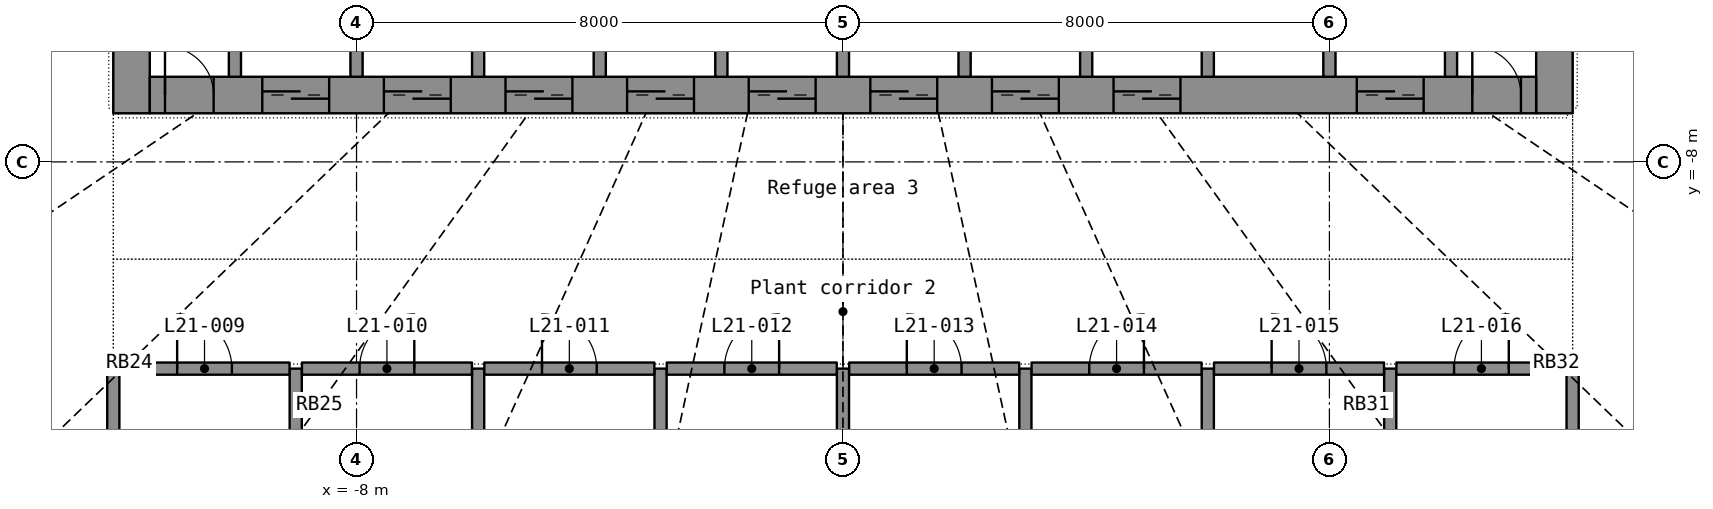
"""IFC4 building model, lengths in metres.
Left out: names, types, materials, properties, quantities, classifications, styles, units other than length and angle.
Written with IfcOpenShell. Run it as: python <this file> out.ifc"""

import sys

from ifc_helpers import new_model, si_unit, direction, frame, frame_2d, origin, place, context, subcontext, project, spatial, rectangle, extrude, element, fill, save


model = new_model("IFC4")
c1 = context("Model", 3, precision=1e-05, world=origin(), true_north=direction((0.0, 1.0)))
c2 = subcontext(c1, "Body", "Model", "MODEL_VIEW")
j1 = project(units=[si_unit("LENGTHUNIT", "METRE"), si_unit("PLANEANGLEUNIT", "RADIAN")], contexts=[c1])
p1 = place(None, origin())
s1 = spatial("IfcSite", under=j1, at=p1, CompositionType="ELEMENT")
p2 = place(p1, origin())
s2 = spatial("IfcBuilding", under=s1, at=p2, CompositionType="ELEMENT")
p3 = place(p2, frame((0.0, 0.0, 92.6)))
s3 = spatial("IfcBuildingStorey", under=s2, at=p3, CompositionType="ELEMENT", Elevation=92.6)
p4 = place(p3, frame((-11.7, -7.2, 0.0), z_axis=(0.0, 0.0, 1.0), x_axis=(0.0, 1.0, 0.0)))
e1 = element("IfcWall", 1, at=p4, inside=s3, PredefinedType="SHEAR", context=c2, shape_type="SweptSolid", body=[
    extrude(rectangle(XDim=14.4, YDim=0.6, at=frame_2d((7.2, 0.0))), origin(), (0.0, 0.0, 1.0), 4.1),
])
p5 = place(p4, frame((6.5, 0.0, 0.0)))
e2 = element("IfcOpeningElement", 2, at=p5, cuts=e1, PredefinedType="OPENING", context=c2, shape_type="SweptSolid", body=[
    extrude(rectangle(XDim=1.4, YDim=2.2, at=frame_2d((0.7, 1.1))), frame((0.0, 0.31, 0.0), z_axis=(0.0, -1.0, 0.0), x_axis=(1.0, 0.0, 0.0)), (0.0, 0.0, 1.0), 0.62),
])
p6 = place(p3, frame((11.7, -7.2, 0.0), z_axis=(0.0, 0.0, 1.0), x_axis=(0.0, 1.0, 0.0)))
e3 = element("IfcWall", 3, at=p6, inside=s3, PredefinedType="SHEAR", context=c2, shape_type="SweptSolid", body=[
    extrude(rectangle(XDim=14.4, YDim=0.6, at=frame_2d((7.2, 0.0))), origin(), (0.0, 0.0, 1.0), 4.1),
])
p7 = place(p6, frame((6.5, 0.0, 0.0)))
e4 = element("IfcOpeningElement", 4, at=p7, cuts=e3, PredefinedType="OPENING", context=c2, shape_type="SweptSolid", body=[
    extrude(rectangle(XDim=1.4, YDim=2.2, at=frame_2d((0.7, 1.1))), frame((0.0, 0.31, 0.0), z_axis=(0.0, -1.0, 0.0), x_axis=(1.0, 0.0, 0.0)), (0.0, 0.0, 1.0), 0.62),
])
p8 = place(p3, frame((-11.4, -6.9, 0.0), z_axis=(0.0, 0.0, 1.0), x_axis=(1.0, 0.0, 0.0)))
e5 = element("IfcWall", 5, at=p8, inside=s3, PredefinedType="SHEAR", context=c2, shape_type="SweptSolid", body=[
    extrude(rectangle(XDim=22.8, YDim=0.6, at=frame_2d((11.4, 0.0))), origin(), (0.0, 0.0, 1.0), 4.1),
])
p9 = place(p8, frame((1.85, 0.0, 0.0)))
e6 = element("IfcOpeningElement", 6, at=p9, cuts=e5, PredefinedType="OPENING", context=c2, shape_type="SweptSolid", body=[
    extrude(rectangle(XDim=1.1, YDim=2.2, at=frame_2d((0.55, 1.1))), frame((0.0, 0.31, 0.0), z_axis=(0.0, -1.0, 0.0), x_axis=(1.0, 0.0, 0.0)), (0.0, 0.0, 1.0), 0.62),
])
p10 = place(p8, frame((3.85, 0.0, 0.0)))
e7 = element("IfcOpeningElement", 7, at=p10, cuts=e5, PredefinedType="OPENING", context=c2, shape_type="SweptSolid", body=[
    extrude(rectangle(XDim=1.1, YDim=2.2, at=frame_2d((0.55, 1.1))), frame((0.0, 0.31, 0.0), z_axis=(0.0, -1.0, 0.0), x_axis=(1.0, 0.0, 0.0)), (0.0, 0.0, 1.0), 0.62),
])
p11 = place(p8, frame((5.85, 0.0, 0.0)))
e8 = element("IfcOpeningElement", 8, at=p11, cuts=e5, PredefinedType="OPENING", context=c2, shape_type="SweptSolid", body=[
    extrude(rectangle(XDim=1.1, YDim=2.2, at=frame_2d((0.55, 1.1))), frame((0.0, 0.31, 0.0), z_axis=(0.0, -1.0, 0.0), x_axis=(1.0, 0.0, 0.0)), (0.0, 0.0, 1.0), 0.62),
])
p12 = place(p8, frame((7.85, 0.0, 0.0)))
e9 = element("IfcOpeningElement", 9, at=p12, cuts=e5, PredefinedType="OPENING", context=c2, shape_type="SweptSolid", body=[
    extrude(rectangle(XDim=1.1, YDim=2.2, at=frame_2d((0.55, 1.1))), frame((0.0, 0.31, 0.0), z_axis=(0.0, -1.0, 0.0), x_axis=(1.0, 0.0, 0.0)), (0.0, 0.0, 1.0), 0.62),
])
p13 = place(p8, frame((9.85, 0.0, 0.0)))
e10 = element("IfcOpeningElement", 10, at=p13, cuts=e5, PredefinedType="OPENING", context=c2, shape_type="SweptSolid", body=[
    extrude(rectangle(XDim=1.1, YDim=2.2, at=frame_2d((0.55, 1.1))), frame((0.0, 0.31, 0.0), z_axis=(0.0, -1.0, 0.0), x_axis=(1.0, 0.0, 0.0)), (0.0, 0.0, 1.0), 0.62),
])
p14 = place(p8, frame((11.85, 0.0, 0.0)))
e11 = element("IfcOpeningElement", 11, at=p14, cuts=e5, PredefinedType="OPENING", context=c2, shape_type="SweptSolid", body=[
    extrude(rectangle(XDim=1.1, YDim=2.2, at=frame_2d((0.55, 1.1))), frame((0.0, 0.31, 0.0), z_axis=(0.0, -1.0, 0.0), x_axis=(1.0, 0.0, 0.0)), (0.0, 0.0, 1.0), 0.62),
])
p15 = place(p8, frame((13.85, 0.0, 0.0)))
e12 = element("IfcOpeningElement", 12, at=p15, cuts=e5, PredefinedType="OPENING", context=c2, shape_type="SweptSolid", body=[
    extrude(rectangle(XDim=1.1, YDim=2.2, at=frame_2d((0.55, 1.1))), frame((0.0, 0.31, 0.0), z_axis=(0.0, -1.0, 0.0), x_axis=(1.0, 0.0, 0.0)), (0.0, 0.0, 1.0), 0.62),
])
p16 = place(p8, frame((15.85, 0.0, 0.0)))
e13 = element("IfcOpeningElement", 13, at=p16, cuts=e5, PredefinedType="OPENING", context=c2, shape_type="SweptSolid", body=[
    extrude(rectangle(XDim=1.1, YDim=2.2, at=frame_2d((0.55, 1.1))), frame((0.0, 0.31, 0.0), z_axis=(0.0, -1.0, 0.0), x_axis=(1.0, 0.0, 0.0)), (0.0, 0.0, 1.0), 0.62),
])
p17 = place(p8, frame((19.85, 0.0, 0.0)))
e14 = element("IfcOpeningElement", 14, at=p17, cuts=e5, PredefinedType="OPENING", context=c2, shape_type="SweptSolid", body=[
    extrude(rectangle(XDim=1.1, YDim=2.2, at=frame_2d((0.55, 1.1))), frame((0.0, 0.31, 0.0), z_axis=(0.0, -1.0, 0.0), x_axis=(1.0, 0.0, 0.0)), (0.0, 0.0, 1.0), 0.62),
])
p18 = place(p8, frame((0.25, 0.0, 0.0)))
e15 = element("IfcOpeningElement", 15, at=p18, cuts=e5, PredefinedType="OPENING", context=c2, shape_type="SweptSolid", body=[
    extrude(rectangle(XDim=0.8, YDim=2.05, at=frame_2d((0.4, 1.025))), frame((0.0, 0.31, 0.0), z_axis=(0.0, -1.0, 0.0), x_axis=(1.0, 0.0, 0.0)), (0.0, 0.0, 1.0), 0.62),
])
p19 = place(p8, frame((21.75, 0.0, 0.0)))
e16 = element("IfcOpeningElement", 16, at=p19, cuts=e5, PredefinedType="OPENING", context=c2, shape_type="SweptSolid", body=[
    extrude(rectangle(XDim=0.8, YDim=2.05, at=frame_2d((0.4, 1.025))), frame((0.0, 0.31, 0.0), z_axis=(0.0, -1.0, 0.0), x_axis=(1.0, 0.0, 0.0)), (0.0, 0.0, 1.0), 0.62),
])
for number, where, z_axis, x_axis in (
    (17, (-10.0, -6.6, 0.0), (0.0, 0.0, 1.0), (0.0, 1.0, 0.0)),
    (18, (-8.0, -6.6, 0.0), (0.0, 0.0, 1.0), (0.0, 1.0, 0.0)),
    (19, (-6.0, -6.6, 0.0), (0.0, 0.0, 1.0), (0.0, 1.0, 0.0)),
    (20, (-4.0, -6.6, 0.0), (0.0, 0.0, 1.0), (0.0, 1.0, 0.0)),
    (21, (-2.0, -6.6, 0.0), (0.0, 0.0, 1.0), (0.0, 1.0, 0.0)),
    (22, (0.0, -6.6, 0.0), (0.0, 0.0, 1.0), (0.0, 1.0, 0.0)),
    (23, (2.0, -6.6, 0.0), (0.0, 0.0, 1.0), (0.0, 1.0, 0.0)),
    (24, (4.0, -6.6, 0.0), (0.0, 0.0, 1.0), (0.0, 1.0, 0.0)),
    (25, (6.0, -6.6, 0.0), (0.0, 0.0, 1.0), (0.0, 1.0, 0.0)),
    (26, (8.0, -6.6, 0.0), (0.0, 0.0, 1.0), (0.0, 1.0, 0.0)),
    (27, (10.0, -6.6, 0.0), (0.0, 0.0, 1.0), (0.0, 1.0, 0.0)),
):
    element("IfcWall", number, at=place(p3, frame(where, z_axis=z_axis, x_axis=x_axis)), inside=s3, PredefinedType="SHEAR", context=c2, shape_type="SweptSolid", body=[
        extrude(rectangle(XDim=2.7, YDim=0.2, at=frame_2d((1.35, 0.0))), origin(), (0.0, 0.0, 1.0), 4.1),
    ])
p20 = place(p3, frame((0.0, -21.51, 0.0), z_axis=(0.0, 0.0, 1.0), x_axis=(0.0, 1.0, 0.0)))
e28 = element("IfcWall", 28, at=p20, inside=s3, PredefinedType="PARTITIONING", context=c2, shape_type="SweptSolid", body=[
    extrude(rectangle(XDim=10.11, YDim=0.2, at=frame_2d((5.055, 0.0))), origin(), (0.0, 0.0, 1.0), 3.3),
])
for number, where, z_axis, x_axis in (
    (29, (-3.0, -21.186, 0.0), (0.0, 0.0, 1.0), (0.0, 1.0, 0.0)),
    (30, (3.0, -21.186, 0.0), (0.0, 0.0, 1.0), (0.0, 1.0, 0.0)),
):
    element("IfcWall", number, at=place(p3, frame(where, z_axis=z_axis, x_axis=x_axis)), inside=s3, PredefinedType="PARTITIONING", context=c2, shape_type="SweptSolid", body=[
        extrude(rectangle(XDim=9.786, YDim=0.2, at=frame_2d((4.893, 0.0))), origin(), (0.0, 0.0, 1.0), 3.3),
    ])
for number, where, z_axis, x_axis in (
    (31, (-6.0, -20.862, 0.0), (0.0, 0.0, 1.0), (0.0, 1.0, 0.0)),
    (32, (6.0, -20.862, 0.0), (0.0, 0.0, 1.0), (0.0, 1.0, 0.0)),
):
    element("IfcWall", number, at=place(p3, frame(where, z_axis=z_axis, x_axis=x_axis)), inside=s3, PredefinedType="PARTITIONING", context=c2, shape_type="SweptSolid", body=[
        extrude(rectangle(XDim=9.462, YDim=0.2, at=frame_2d((4.731, 0.0))), origin(), (0.0, 0.0, 1.0), 3.3),
    ])
for number, where, z_axis, x_axis in (
    (33, (-9.0, -20.031, 0.0), (0.0, 0.0, 1.0), (0.0, 1.0, 0.0)),
    (34, (9.0, -20.031, 0.0), (0.0, 0.0, 1.0), (0.0, 1.0, 0.0)),
):
    element("IfcWall", number, at=place(p3, frame(where, z_axis=z_axis, x_axis=x_axis)), inside=s3, PredefinedType="PARTITIONING", context=c2, shape_type="SweptSolid", body=[
        extrude(rectangle(XDim=8.631, YDim=0.2, at=frame_2d((4.316, 0.0))), origin(), (0.0, 0.0, 1.0), 3.3),
    ])
for number, where, z_axis, x_axis in (
    (35, (-12.0, -11.388, 0.0), (0.0, 0.0, 1.0), (0.0, -1.0, 0.0)),
    (36, (12.0, -19.013, 0.0), (0.0, 0.0, 1.0), (0.0, 1.0, 0.0)),
):
    element("IfcWall", number, at=place(p3, frame(where, z_axis=z_axis, x_axis=x_axis)), inside=s3, PredefinedType="PARTITIONING", context=c2, shape_type="SweptSolid", body=[
        extrude(rectangle(XDim=7.625, YDim=0.2, at=frame_2d((3.813, 0.0))), origin(), (0.0, 0.0, 1.0), 3.3),
    ])
p21 = place(p3, frame((-11.898, -11.4, 0.0), z_axis=(0.0, 0.0, 1.0), x_axis=(1.0, 0.0, 0.0)))
e37 = element("IfcWall", 37, at=p21, inside=s3, PredefinedType="PARTITIONING", context=c2, shape_type="SweptSolid", body=[
    extrude(rectangle(XDim=2.796, YDim=0.2, at=frame_2d((1.398, 0.0))), origin(), (0.0, 0.0, 1.0), 3.3),
])
p22 = place(p21, frame((0.948, 0.0, 0.0)))
e38 = element("IfcOpeningElement", 38, at=p22, cuts=e37, PredefinedType="OPENING", context=c2, shape_type="SweptSolid", body=[
    extrude(rectangle(XDim=0.9, YDim=2.1, at=frame_2d((0.45, 1.05))), frame((0.0, 0.11, 0.0), z_axis=(0.0, -1.0, 0.0), x_axis=(1.0, 0.0, 0.0)), (0.0, 0.0, 1.0), 0.22),
])
p23 = place(p3, frame((-8.898, -11.4, 0.0), z_axis=(0.0, 0.0, 1.0), x_axis=(1.0, 0.0, 0.0)))
e39 = element("IfcWall", 39, at=p23, inside=s3, PredefinedType="PARTITIONING", context=c2, shape_type="SweptSolid", body=[
    extrude(rectangle(XDim=2.796, YDim=0.2, at=frame_2d((1.398, 0.0))), origin(), (0.0, 0.0, 1.0), 3.3),
])
p24 = place(p23, frame((0.948, 0.0, 0.0)))
e40 = element("IfcOpeningElement", 40, at=p24, cuts=e39, PredefinedType="OPENING", context=c2, shape_type="SweptSolid", body=[
    extrude(rectangle(XDim=0.9, YDim=2.1, at=frame_2d((0.45, 1.05))), frame((0.0, 0.11, 0.0), z_axis=(0.0, -1.0, 0.0), x_axis=(1.0, 0.0, 0.0)), (0.0, 0.0, 1.0), 0.22),
])
p25 = place(p3, frame((-5.898, -11.4, 0.0), z_axis=(0.0, 0.0, 1.0), x_axis=(1.0, 0.0, 0.0)))
e41 = element("IfcWall", 41, at=p25, inside=s3, PredefinedType="PARTITIONING", context=c2, shape_type="SweptSolid", body=[
    extrude(rectangle(XDim=2.796, YDim=0.2, at=frame_2d((1.398, 0.0))), origin(), (0.0, 0.0, 1.0), 3.3),
])
p26 = place(p25, frame((0.948, 0.0, 0.0)))
e42 = element("IfcOpeningElement", 42, at=p26, cuts=e41, PredefinedType="OPENING", context=c2, shape_type="SweptSolid", body=[
    extrude(rectangle(XDim=0.9, YDim=2.1, at=frame_2d((0.45, 1.05))), frame((0.0, 0.11, 0.0), z_axis=(0.0, -1.0, 0.0), x_axis=(1.0, 0.0, 0.0)), (0.0, 0.0, 1.0), 0.22),
])
p27 = place(p3, frame((-2.898, -11.4, 0.0), z_axis=(0.0, 0.0, 1.0), x_axis=(1.0, 0.0, 0.0)))
e43 = element("IfcWall", 43, at=p27, inside=s3, PredefinedType="PARTITIONING", context=c2, shape_type="SweptSolid", body=[
    extrude(rectangle(XDim=2.796, YDim=0.2, at=frame_2d((1.398, 0.0))), origin(), (0.0, 0.0, 1.0), 3.3),
])
p28 = place(p27, frame((0.948, 0.0, 0.0)))
e44 = element("IfcOpeningElement", 44, at=p28, cuts=e43, PredefinedType="OPENING", context=c2, shape_type="SweptSolid", body=[
    extrude(rectangle(XDim=0.9, YDim=2.1, at=frame_2d((0.45, 1.05))), frame((0.0, 0.11, 0.0), z_axis=(0.0, -1.0, 0.0), x_axis=(1.0, 0.0, 0.0)), (0.0, 0.0, 1.0), 0.22),
])
p29 = place(p3, frame((0.102, -11.4, 0.0), z_axis=(0.0, 0.0, 1.0), x_axis=(1.0, 0.0, 0.0)))
e45 = element("IfcWall", 45, at=p29, inside=s3, PredefinedType="PARTITIONING", context=c2, shape_type="SweptSolid", body=[
    extrude(rectangle(XDim=2.796, YDim=0.2, at=frame_2d((1.398, 0.0))), origin(), (0.0, 0.0, 1.0), 3.3),
])
p30 = place(p29, frame((0.948, 0.0, 0.0)))
e46 = element("IfcOpeningElement", 46, at=p30, cuts=e45, PredefinedType="OPENING", context=c2, shape_type="SweptSolid", body=[
    extrude(rectangle(XDim=0.9, YDim=2.1, at=frame_2d((0.45, 1.05))), frame((0.0, 0.11, 0.0), z_axis=(0.0, -1.0, 0.0), x_axis=(1.0, 0.0, 0.0)), (0.0, 0.0, 1.0), 0.22),
])
p31 = place(p3, frame((3.102, -11.4, 0.0), z_axis=(0.0, 0.0, 1.0), x_axis=(1.0, 0.0, 0.0)))
e47 = element("IfcWall", 47, at=p31, inside=s3, PredefinedType="PARTITIONING", context=c2, shape_type="SweptSolid", body=[
    extrude(rectangle(XDim=2.796, YDim=0.2, at=frame_2d((1.398, 0.0))), origin(), (0.0, 0.0, 1.0), 3.3),
])
p32 = place(p31, frame((0.948, 0.0, 0.0)))
e48 = element("IfcOpeningElement", 48, at=p32, cuts=e47, PredefinedType="OPENING", context=c2, shape_type="SweptSolid", body=[
    extrude(rectangle(XDim=0.9, YDim=2.1, at=frame_2d((0.45, 1.05))), frame((0.0, 0.11, 0.0), z_axis=(0.0, -1.0, 0.0), x_axis=(1.0, 0.0, 0.0)), (0.0, 0.0, 1.0), 0.22),
])
p33 = place(p3, frame((6.102, -11.4, 0.0), z_axis=(0.0, 0.0, 1.0), x_axis=(1.0, 0.0, 0.0)))
e49 = element("IfcWall", 49, at=p33, inside=s3, PredefinedType="PARTITIONING", context=c2, shape_type="SweptSolid", body=[
    extrude(rectangle(XDim=2.796, YDim=0.2, at=frame_2d((1.398, 0.0))), origin(), (0.0, 0.0, 1.0), 3.3),
])
p34 = place(p33, frame((0.948, 0.0, 0.0)))
e50 = element("IfcOpeningElement", 50, at=p34, cuts=e49, PredefinedType="OPENING", context=c2, shape_type="SweptSolid", body=[
    extrude(rectangle(XDim=0.9, YDim=2.1, at=frame_2d((0.45, 1.05))), frame((0.0, 0.11, 0.0), z_axis=(0.0, -1.0, 0.0), x_axis=(1.0, 0.0, 0.0)), (0.0, 0.0, 1.0), 0.22),
])
p35 = place(p3, frame((9.102, -11.4, 0.0), z_axis=(0.0, 0.0, 1.0), x_axis=(1.0, 0.0, 0.0)))
e51 = element("IfcWall", 51, at=p35, inside=s3, PredefinedType="PARTITIONING", context=c2, shape_type="SweptSolid", body=[
    extrude(rectangle(XDim=2.796, YDim=0.2, at=frame_2d((1.398, 0.0))), origin(), (0.0, 0.0, 1.0), 3.3),
])
p36 = place(p35, frame((0.948, 0.0, 0.0)))
e52 = element("IfcOpeningElement", 52, at=p36, cuts=e51, PredefinedType="OPENING", context=c2, shape_type="SweptSolid", body=[
    extrude(rectangle(XDim=0.9, YDim=2.1, at=frame_2d((0.45, 1.05))), frame((0.0, 0.11, 0.0), z_axis=(0.0, -1.0, 0.0), x_axis=(1.0, 0.0, 0.0)), (0.0, 0.0, 1.0), 0.22),
])
p37 = place(p9, origin())
e53 = element("IfcDoor", 53, at=p37, inside=s3, OperationType="DOUBLE_DOOR_SLIDING", PredefinedType="DOOR", context=c2, shape_type="SweptSolid", body=[
    extrude(rectangle(XDim=1.1, YDim=2.2, at=frame_2d((0.55, 1.1))), frame((0.0, 0.025, 0.0), z_axis=(0.0, -1.0, 0.0), x_axis=(1.0, 0.0, 0.0)), (0.0, 0.0, 1.0), 0.05),
])
fill(e6, e53)
p38 = place(p10, origin())
e54 = element("IfcDoor", 54, at=p38, inside=s3, OperationType="DOUBLE_DOOR_SLIDING", PredefinedType="DOOR", context=c2, shape_type="SweptSolid", body=[
    extrude(rectangle(XDim=1.1, YDim=2.2, at=frame_2d((0.55, 1.1))), frame((0.0, 0.025, 0.0), z_axis=(0.0, -1.0, 0.0), x_axis=(1.0, 0.0, 0.0)), (0.0, 0.0, 1.0), 0.05),
])
fill(e7, e54)
p39 = place(p11, origin())
e55 = element("IfcDoor", 55, at=p39, inside=s3, OperationType="DOUBLE_DOOR_SLIDING", PredefinedType="DOOR", context=c2, shape_type="SweptSolid", body=[
    extrude(rectangle(XDim=1.1, YDim=2.2, at=frame_2d((0.55, 1.1))), frame((0.0, 0.025, 0.0), z_axis=(0.0, -1.0, 0.0), x_axis=(1.0, 0.0, 0.0)), (0.0, 0.0, 1.0), 0.05),
])
fill(e8, e55)
p40 = place(p12, origin())
e56 = element("IfcDoor", 56, at=p40, inside=s3, OperationType="DOUBLE_DOOR_SLIDING", PredefinedType="DOOR", context=c2, shape_type="SweptSolid", body=[
    extrude(rectangle(XDim=1.1, YDim=2.2, at=frame_2d((0.55, 1.1))), frame((0.0, 0.025, 0.0), z_axis=(0.0, -1.0, 0.0), x_axis=(1.0, 0.0, 0.0)), (0.0, 0.0, 1.0), 0.05),
])
fill(e9, e56)
p41 = place(p13, origin())
e57 = element("IfcDoor", 57, at=p41, inside=s3, OperationType="DOUBLE_DOOR_SLIDING", PredefinedType="DOOR", context=c2, shape_type="SweptSolid", body=[
    extrude(rectangle(XDim=1.1, YDim=2.2, at=frame_2d((0.55, 1.1))), frame((0.0, 0.025, 0.0), z_axis=(0.0, -1.0, 0.0), x_axis=(1.0, 0.0, 0.0)), (0.0, 0.0, 1.0), 0.05),
])
fill(e10, e57)
p42 = place(p14, origin())
e58 = element("IfcDoor", 58, at=p42, inside=s3, OperationType="DOUBLE_DOOR_SLIDING", PredefinedType="DOOR", context=c2, shape_type="SweptSolid", body=[
    extrude(rectangle(XDim=1.1, YDim=2.2, at=frame_2d((0.55, 1.1))), frame((0.0, 0.025, 0.0), z_axis=(0.0, -1.0, 0.0), x_axis=(1.0, 0.0, 0.0)), (0.0, 0.0, 1.0), 0.05),
])
fill(e11, e58)
p43 = place(p15, origin())
e59 = element("IfcDoor", 59, at=p43, inside=s3, OperationType="DOUBLE_DOOR_SLIDING", PredefinedType="DOOR", context=c2, shape_type="SweptSolid", body=[
    extrude(rectangle(XDim=1.1, YDim=2.2, at=frame_2d((0.55, 1.1))), frame((0.0, 0.025, 0.0), z_axis=(0.0, -1.0, 0.0), x_axis=(1.0, 0.0, 0.0)), (0.0, 0.0, 1.0), 0.05),
])
fill(e12, e59)
p44 = place(p16, origin())
e60 = element("IfcDoor", 60, at=p44, inside=s3, OperationType="DOUBLE_DOOR_SLIDING", PredefinedType="DOOR", context=c2, shape_type="SweptSolid", body=[
    extrude(rectangle(XDim=1.1, YDim=2.2, at=frame_2d((0.55, 1.1))), frame((0.0, 0.025, 0.0), z_axis=(0.0, -1.0, 0.0), x_axis=(1.0, 0.0, 0.0)), (0.0, 0.0, 1.0), 0.05),
])
fill(e13, e60)
p45 = place(p17, origin())
e61 = element("IfcDoor", 61, at=p45, inside=s3, OperationType="DOUBLE_DOOR_SLIDING", PredefinedType="DOOR", context=c2, shape_type="SweptSolid", body=[
    extrude(rectangle(XDim=1.1, YDim=2.2, at=frame_2d((0.55, 1.1))), frame((0.0, 0.025, 0.0), z_axis=(0.0, -1.0, 0.0), x_axis=(1.0, 0.0, 0.0)), (0.0, 0.0, 1.0), 0.05),
])
fill(e14, e61)
p46 = place(p18, origin())
e62 = element("IfcDoor", 62, at=p46, inside=s3, OperationType="SINGLE_SWING_LEFT", PredefinedType="DOOR", context=c2, shape_type="SweptSolid", body=[
    extrude(rectangle(XDim=0.8, YDim=2.05, at=frame_2d((0.4, 1.025))), frame((0.0, 0.025, 0.0), z_axis=(0.0, -1.0, 0.0), x_axis=(1.0, 0.0, 0.0)), (0.0, 0.0, 1.0), 0.05),
])
fill(e15, e62)
p47 = place(p19, origin())
e63 = element("IfcDoor", 63, at=p47, inside=s3, OperationType="SINGLE_SWING_LEFT", PredefinedType="DOOR", context=c2, shape_type="SweptSolid", body=[
    extrude(rectangle(XDim=0.8, YDim=2.05, at=frame_2d((0.4, 1.025))), frame((0.0, 0.025, 0.0), z_axis=(0.0, -1.0, 0.0), x_axis=(1.0, 0.0, 0.0)), (0.0, 0.0, 1.0), 0.05),
])
fill(e16, e63)
p48 = place(p22, origin())
e64 = element("IfcDoor", 64, at=p48, inside=s3, OperationType="SINGLE_SWING_LEFT", PredefinedType="DOOR", context=c2, shape_type="SweptSolid", body=[
    extrude(rectangle(XDim=0.9, YDim=2.1, at=frame_2d((0.45, 1.05))), frame((0.0, 0.025, 0.0), z_axis=(0.0, -1.0, 0.0), x_axis=(1.0, 0.0, 0.0)), (0.0, 0.0, 1.0), 0.05),
])
fill(e38, e64)
p49 = place(p24, origin())
e65 = element("IfcDoor", 65, at=p49, inside=s3, OperationType="SINGLE_SWING_RIGHT", PredefinedType="DOOR", context=c2, shape_type="SweptSolid", body=[
    extrude(rectangle(XDim=0.9, YDim=2.1, at=frame_2d((0.45, 1.05))), frame((0.0, 0.025, 0.0), z_axis=(0.0, -1.0, 0.0), x_axis=(1.0, 0.0, 0.0)), (0.0, 0.0, 1.0), 0.05),
])
fill(e40, e65)
p50 = place(p26, origin())
e66 = element("IfcDoor", 66, at=p50, inside=s3, OperationType="SINGLE_SWING_LEFT", PredefinedType="DOOR", context=c2, shape_type="SweptSolid", body=[
    extrude(rectangle(XDim=0.9, YDim=2.1, at=frame_2d((0.45, 1.05))), frame((0.0, 0.025, 0.0), z_axis=(0.0, -1.0, 0.0), x_axis=(1.0, 0.0, 0.0)), (0.0, 0.0, 1.0), 0.05),
])
fill(e42, e66)
p51 = place(p28, origin())
e67 = element("IfcDoor", 67, at=p51, inside=s3, OperationType="SINGLE_SWING_RIGHT", PredefinedType="DOOR", context=c2, shape_type="SweptSolid", body=[
    extrude(rectangle(XDim=0.9, YDim=2.1, at=frame_2d((0.45, 1.05))), frame((0.0, 0.025, 0.0), z_axis=(0.0, -1.0, 0.0), x_axis=(1.0, 0.0, 0.0)), (0.0, 0.0, 1.0), 0.05),
])
fill(e44, e67)
p52 = place(p30, origin())
e68 = element("IfcDoor", 68, at=p52, inside=s3, OperationType="SINGLE_SWING_LEFT", PredefinedType="DOOR", context=c2, shape_type="SweptSolid", body=[
    extrude(rectangle(XDim=0.9, YDim=2.1, at=frame_2d((0.45, 1.05))), frame((0.0, 0.025, 0.0), z_axis=(0.0, -1.0, 0.0), x_axis=(1.0, 0.0, 0.0)), (0.0, 0.0, 1.0), 0.05),
])
fill(e46, e68)
p53 = place(p32, origin())
e69 = element("IfcDoor", 69, at=p53, inside=s3, OperationType="SINGLE_SWING_RIGHT", PredefinedType="DOOR", context=c2, shape_type="SweptSolid", body=[
    extrude(rectangle(XDim=0.9, YDim=2.1, at=frame_2d((0.45, 1.05))), frame((0.0, 0.025, 0.0), z_axis=(0.0, -1.0, 0.0), x_axis=(1.0, 0.0, 0.0)), (0.0, 0.0, 1.0), 0.05),
])
fill(e48, e69)
p54 = place(p34, origin())
e70 = element("IfcDoor", 70, at=p54, inside=s3, OperationType="SINGLE_SWING_LEFT", PredefinedType="DOOR", context=c2, shape_type="SweptSolid", body=[
    extrude(rectangle(XDim=0.9, YDim=2.1, at=frame_2d((0.45, 1.05))), frame((0.0, 0.025, 0.0), z_axis=(0.0, -1.0, 0.0), x_axis=(1.0, 0.0, 0.0)), (0.0, 0.0, 1.0), 0.05),
])
fill(e50, e70)
p55 = place(p36, origin())
e71 = element("IfcDoor", 71, at=p55, inside=s3, OperationType="SINGLE_SWING_RIGHT", PredefinedType="DOOR", context=c2, shape_type="SweptSolid", body=[
    extrude(rectangle(XDim=0.9, YDim=2.1, at=frame_2d((0.45, 1.05))), frame((0.0, 0.025, 0.0), z_axis=(0.0, -1.0, 0.0), x_axis=(1.0, 0.0, 0.0)), (0.0, 0.0, 1.0), 0.05),
])
fill(e52, e71)
save(model, sys.argv[1])
